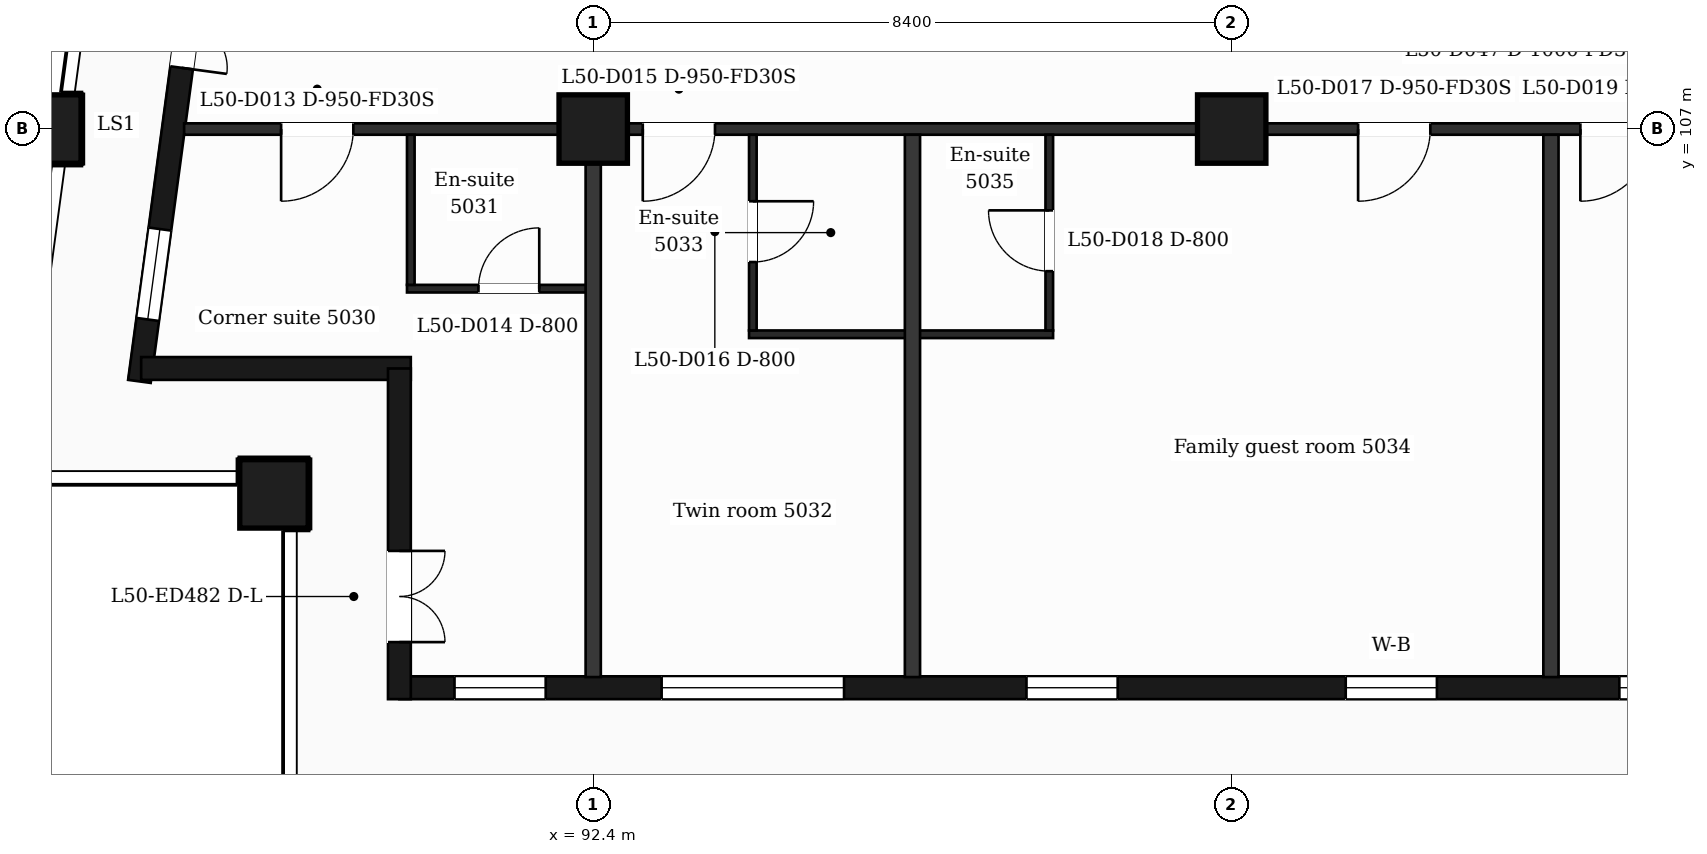
"""IFC4 building model, lengths in metres.
Left out: names, types, materials, properties, quantities, classifications, styles, units other than length and angle.
Written with IfcOpenShell. Run it as: python <this file> out.ifc"""

import sys

from ifc_helpers import new_model, si_unit, direction, frame, frame_2d, origin, origin_2d, place, context, subcontext, project, spatial, rectangle, extrude, element, fill, save


model = new_model("IFC4")
c1 = context("Model", 3, precision=1e-05, world=origin(), true_north=direction((0.0, 1.0)))
c2 = subcontext(c1, "Body", "Model", "MODEL_VIEW")
j1 = project(units=[si_unit("LENGTHUNIT", "METRE"), si_unit("PLANEANGLEUNIT", "RADIAN")], contexts=[c1])
p1 = place(None, origin())
s1 = spatial("IfcSite", under=j1, at=p1, CompositionType="ELEMENT")
p2 = place(p1, origin())
s2 = spatial("IfcBuilding", under=s1, at=p2, CompositionType="ELEMENT")
p3 = place(p2, frame((0.0, 0.0, 209.6)))
s3 = spatial("IfcBuildingStorey", under=s2, at=p3, CompositionType="ELEMENT", Elevation=209.6)
for number, where, z_axis, x_axis in (
    (1, (88.2, 102.2, 0.0), (0.0, 0.0, 1.0), (1.0, 0.0, 0.0)),
    (2, (92.4, 107.0, 0.0), (0.0, 0.0, 1.0), (1.0, 0.0, 0.0)),
    (3, (100.8, 107.0, 0.0), (0.0, 0.0, 1.0), (1.0, 0.0, 0.0)),
    (4, (85.211, 107.0, 0.0), (0.0, 0.0, 1.0), (1.0, 0.0, 0.0)),
):
    element("IfcColumn", number, at=place(p3, frame(where, z_axis=z_axis, x_axis=x_axis)), inside=s3, PredefinedType="COLUMN", context=c2, shape_type="SweptSolid", body=[
        extrude(rectangle(XDim=0.9, YDim=0.9, at=origin_2d()), origin(), (0.0, 0.0, 1.0), 3.7),
    ])
p4 = place(p3, frame((89.85, 99.65, 0.0), z_axis=(0.0, 0.0, 1.0), x_axis=(1.0, 0.0, 0.0)))
e5 = element("IfcWall", 5, at=p4, inside=s3, PredefinedType="SOLIDWALL", context=c2, shape_type="SweptSolid", body=[
    extrude(rectangle(XDim=47.25, YDim=0.3, at=frame_2d((23.625, 0.0))), origin(), (0.0, 0.0, 1.0), 3.38),
])
p5 = place(p4, frame((0.725, 0.0, 0.9)))
e6 = element("IfcOpeningElement", 6, at=p5, cuts=e5, PredefinedType="OPENING", context=c2, shape_type="SweptSolid", body=[
    extrude(rectangle(XDim=1.2, YDim=2.1, at=frame_2d((0.6, 1.05))), frame((0.0, 0.16, 0.0), z_axis=(0.0, -1.0, 0.0), x_axis=(1.0, 0.0, 0.0)), (0.0, 0.0, 1.0), 0.32),
])
p6 = place(p4, frame((3.45, 0.0, 0.9)))
e7 = element("IfcOpeningElement", 7, at=p6, cuts=e5, PredefinedType="OPENING", context=c2, shape_type="SweptSolid", body=[
    extrude(rectangle(XDim=2.4, YDim=2.1, at=frame_2d((1.2, 1.05))), frame((0.0, 0.16, 0.0), z_axis=(0.0, -1.0, 0.0), x_axis=(1.0, 0.0, 0.0)), (0.0, 0.0, 1.0), 0.32),
])
p7 = place(p4, frame((8.25, 0.0, 0.9)))
e8 = element("IfcOpeningElement", 8, at=p7, cuts=e5, PredefinedType="OPENING", context=c2, shape_type="SweptSolid", body=[
    extrude(rectangle(XDim=1.2, YDim=2.1, at=frame_2d((0.6, 1.05))), frame((0.0, 0.16, 0.0), z_axis=(0.0, -1.0, 0.0), x_axis=(1.0, 0.0, 0.0)), (0.0, 0.0, 1.0), 0.32),
])
p8 = place(p4, frame((12.45, 0.0, 0.9)))
e9 = element("IfcOpeningElement", 9, at=p8, cuts=e5, PredefinedType="OPENING", context=c2, shape_type="SweptSolid", body=[
    extrude(rectangle(XDim=1.2, YDim=2.1, at=frame_2d((0.6, 1.05))), frame((0.0, 0.16, 0.0), z_axis=(0.0, -1.0, 0.0), x_axis=(1.0, 0.0, 0.0)), (0.0, 0.0, 1.0), 0.32),
])
p9 = place(p4, frame((16.05, 0.0, 0.9)))
e10 = element("IfcOpeningElement", 10, at=p9, cuts=e5, PredefinedType="OPENING", context=c2, shape_type="SweptSolid", body=[
    extrude(rectangle(XDim=2.4, YDim=2.1, at=frame_2d((1.2, 1.05))), frame((0.0, 0.16, 0.0), z_axis=(0.0, -1.0, 0.0), x_axis=(1.0, 0.0, 0.0)), (0.0, 0.0, 1.0), 0.32),
])
p10 = place(p4, frame((20.25, 0.0, 0.9)))
e11 = element("IfcOpeningElement", 11, at=p10, cuts=e5, PredefinedType="OPENING", context=c2, shape_type="SweptSolid", body=[
    extrude(rectangle(XDim=2.4, YDim=2.1, at=frame_2d((1.2, 1.05))), frame((0.0, 0.16, 0.0), z_axis=(0.0, -1.0, 0.0), x_axis=(1.0, 0.0, 0.0)), (0.0, 0.0, 1.0), 0.32),
])
p11 = place(p4, frame((25.05, 0.0, 0.0)))
e12 = element("IfcOpeningElement", 12, at=p11, cuts=e5, PredefinedType="OPENING", context=c2, shape_type="SweptSolid", body=[
    extrude(rectangle(XDim=1.2, YDim=2.4, at=frame_2d((0.6, 1.2))), frame((0.0, 0.16, 0.0), z_axis=(0.0, -1.0, 0.0), x_axis=(1.0, 0.0, 0.0)), (0.0, 0.0, 1.0), 0.32),
])
p12 = place(p4, frame((28.65, 0.0, 0.9)))
e13 = element("IfcOpeningElement", 13, at=p12, cuts=e5, PredefinedType="OPENING", context=c2, shape_type="SweptSolid", body=[
    extrude(rectangle(XDim=2.4, YDim=2.1, at=frame_2d((1.2, 1.05))), frame((0.0, 0.16, 0.0), z_axis=(0.0, -1.0, 0.0), x_axis=(1.0, 0.0, 0.0)), (0.0, 0.0, 1.0), 0.32),
])
p13 = place(p4, frame((32.85, 0.0, 0.9)))
e14 = element("IfcOpeningElement", 14, at=p13, cuts=e5, PredefinedType="OPENING", context=c2, shape_type="SweptSolid", body=[
    extrude(rectangle(XDim=2.4, YDim=2.1, at=frame_2d((1.2, 1.05))), frame((0.0, 0.16, 0.0), z_axis=(0.0, -1.0, 0.0), x_axis=(1.0, 0.0, 0.0)), (0.0, 0.0, 1.0), 0.32),
])
p14 = place(p4, frame((37.65, 0.0, 0.9)))
e15 = element("IfcOpeningElement", 15, at=p14, cuts=e5, PredefinedType="OPENING", context=c2, shape_type="SweptSolid", body=[
    extrude(rectangle(XDim=1.2, YDim=2.1, at=frame_2d((0.6, 1.05))), frame((0.0, 0.16, 0.0), z_axis=(0.0, -1.0, 0.0), x_axis=(1.0, 0.0, 0.0)), (0.0, 0.0, 1.0), 0.32),
])
p15 = place(p4, frame((41.85, 0.0, 0.9)))
e16 = element("IfcOpeningElement", 16, at=p15, cuts=e5, PredefinedType="OPENING", context=c2, shape_type="SweptSolid", body=[
    extrude(rectangle(XDim=1.2, YDim=2.1, at=frame_2d((0.6, 1.05))), frame((0.0, 0.16, 0.0), z_axis=(0.0, -1.0, 0.0), x_axis=(1.0, 0.0, 0.0)), (0.0, 0.0, 1.0), 0.32),
])
p16 = place(p4, frame((45.25, 0.0, 0.9)))
e17 = element("IfcOpeningElement", 17, at=p16, cuts=e5, PredefinedType="OPENING", context=c2, shape_type="SweptSolid", body=[
    extrude(rectangle(XDim=1.2, YDim=2.1, at=frame_2d((0.6, 1.05))), frame((0.0, 0.16, 0.0), z_axis=(0.0, -1.0, 0.0), x_axis=(1.0, 0.0, 0.0)), (0.0, 0.0, 1.0), 0.32),
])
p17 = place(p3, frame((87.334, 110.4, 0.0), z_axis=(0.0, 0.0, 1.0), x_axis=(-0.133437175554, -0.991057273915, 0.0)))
e18 = element("IfcWall", 18, at=p17, inside=s3, PredefinedType="SOLIDWALL", context=c2, shape_type="SweptSolid", body=[
    extrude(rectangle(XDim=6.781, YDim=0.3, at=frame_2d((3.39, 0.0))), origin(), (0.0, 0.0, 1.0), 3.38),
])
p18 = place(p17, frame((1.418, 0.0, 0.0)))
e19 = element("IfcOpeningElement", 19, at=p18, cuts=e18, PredefinedType="OPENING", context=c2, shape_type="SweptSolid", body=[
    extrude(rectangle(XDim=1.2, YDim=2.4, at=frame_2d((0.6, 1.2))), frame((0.0, 0.16, 0.0), z_axis=(0.0, -1.0, 0.0), x_axis=(1.0, 0.0, 0.0)), (0.0, 0.0, 1.0), 0.32),
])
p19 = place(p17, frame((4.758, 0.0, 0.9)))
e20 = element("IfcOpeningElement", 20, at=p19, cuts=e18, PredefinedType="OPENING", context=c2, shape_type="SweptSolid", body=[
    extrude(rectangle(XDim=1.2, YDim=2.1, at=frame_2d((0.6, 1.05))), frame((0.0, 0.16, 0.0), z_axis=(0.0, -1.0, 0.0), x_axis=(1.0, 0.0, 0.0)), (0.0, 0.0, 1.0), 0.32),
])
p20 = place(p3, frame((86.452, 103.85, 0.0), z_axis=(0.0, 0.0, 1.0), x_axis=(1.0, 0.0, 0.0)))
e21 = element("IfcWall", 21, at=p20, inside=s3, PredefinedType="SOLIDWALL", context=c2, shape_type="SweptSolid", body=[
    extrude(rectangle(XDim=3.548, YDim=0.3, at=frame_2d((1.774, 0.0))), origin(), (0.0, 0.0, 1.0), 3.38),
])
p21 = place(p3, frame((89.85, 103.85, 0.0), z_axis=(0.0, 0.0, 1.0), x_axis=(0.0, -1.0, 0.0)))
e22 = element("IfcWall", 22, at=p21, inside=s3, PredefinedType="SOLIDWALL", context=c2, shape_type="SweptSolid", body=[
    extrude(rectangle(XDim=4.35, YDim=0.3, at=frame_2d((2.175, 0.0))), origin(), (0.0, 0.0, 1.0), 3.38),
])
p22 = place(p21, frame((2.4, 0.0, 0.0)))
e23 = element("IfcOpeningElement", 23, at=p22, cuts=e22, PredefinedType="OPENING", context=c2, shape_type="SweptSolid", body=[
    extrude(rectangle(XDim=1.2, YDim=2.4, at=frame_2d((0.6, 1.2))), frame((0.0, 0.16, 0.0), z_axis=(0.0, -1.0, 0.0), x_axis=(1.0, 0.0, 0.0)), (0.0, 0.0, 1.0), 0.32),
])
p23 = place(p3, frame((94.45, 104.3, 0.0), z_axis=(0.0, 0.0, 1.0), x_axis=(1.0, 0.0, 0.0)))
e24 = element("IfcWall", 24, at=p23, inside=s3, PredefinedType="PARTITIONING", context=c2, shape_type="SweptSolid", body=[
    extrude(rectangle(XDim=4.0, YDim=0.1, at=frame_2d((2.0, 0.0))), origin(), (0.0, 0.0, 1.0), 3.38),
])
p24 = place(p3, frame((89.95, 104.9, 0.0), z_axis=(0.0, 0.0, 1.0), x_axis=(1.0, 0.0, 0.0)))
e25 = element("IfcWall", 25, at=p24, inside=s3, PredefinedType="PARTITIONING", context=c2, shape_type="SweptSolid", body=[
    extrude(rectangle(XDim=2.45, YDim=0.1, at=frame_2d((1.225, 0.0))), origin(), (0.0, 0.0, 1.0), 3.38),
])
p25 = place(p24, frame((0.94, 0.0, 0.0)))
e26 = element("IfcOpeningElement", 26, at=p25, cuts=e25, PredefinedType="OPENING", context=c2, shape_type="SweptSolid", body=[
    extrude(rectangle(XDim=0.8, YDim=2.1, at=frame_2d((0.4, 1.05))), frame((0.0, 0.06, 0.0), z_axis=(0.0, -1.0, 0.0), x_axis=(1.0, 0.0, 0.0)), (0.0, 0.0, 1.0), 0.12),
])
p26 = place(p3, frame((87.018, 107.0, 0.0), z_axis=(0.0, 0.0, 1.0), x_axis=(1.0, 0.0, 0.0)))
e27 = element("IfcWall", 27, at=p26, inside=s3, PredefinedType="PARTITIONING", context=c2, shape_type="SweptSolid", body=[
    extrude(rectangle(XDim=52.765, YDim=0.15, at=frame_2d((26.382, 0.0))), origin(), (0.0, 0.0, 1.0), 3.38),
])
p27 = place(p26, frame((1.276, 0.0, 0.0)))
e28 = element("IfcOpeningElement", 28, at=p27, cuts=e27, PredefinedType="OPENING", context=c2, shape_type="SweptSolid", body=[
    extrude(rectangle(XDim=0.95, YDim=2.1, at=frame_2d((0.475, 1.05))), frame((0.0, 0.085, 0.0), z_axis=(0.0, -1.0, 0.0), x_axis=(1.0, 0.0, 0.0)), (0.0, 0.0, 1.0), 0.17),
])
p28 = place(p26, frame((6.034, 0.0, 0.0)))
e29 = element("IfcOpeningElement", 29, at=p28, cuts=e27, PredefinedType="OPENING", context=c2, shape_type="SweptSolid", body=[
    extrude(rectangle(XDim=0.95, YDim=2.1, at=frame_2d((0.475, 1.05))), frame((0.0, 0.085, 0.0), z_axis=(0.0, -1.0, 0.0), x_axis=(1.0, 0.0, 0.0)), (0.0, 0.0, 1.0), 0.17),
])
p29 = place(p26, frame((15.445, 0.0, 0.0)))
e30 = element("IfcOpeningElement", 30, at=p29, cuts=e27, PredefinedType="OPENING", context=c2, shape_type="SweptSolid", body=[
    extrude(rectangle(XDim=0.95, YDim=2.1, at=frame_2d((0.475, 1.05))), frame((0.0, 0.085, 0.0), z_axis=(0.0, -1.0, 0.0), x_axis=(1.0, 0.0, 0.0)), (0.0, 0.0, 1.0), 0.17),
])
p30 = place(p26, frame((18.369, 0.0, 0.0)))
e31 = element("IfcOpeningElement", 31, at=p30, cuts=e27, PredefinedType="OPENING", context=c2, shape_type="SweptSolid", body=[
    extrude(rectangle(XDim=0.95, YDim=2.1, at=frame_2d((0.475, 1.05))), frame((0.0, 0.085, 0.0), z_axis=(0.0, -1.0, 0.0), x_axis=(1.0, 0.0, 0.0)), (0.0, 0.0, 1.0), 0.17),
])
p31 = place(p26, frame((24.519, 0.0, 0.0)))
e32 = element("IfcOpeningElement", 32, at=p31, cuts=e27, PredefinedType="OPENING", context=c2, shape_type="SweptSolid", body=[
    extrude(rectangle(XDim=0.95, YDim=2.1, at=frame_2d((0.475, 1.05))), frame((0.0, 0.085, 0.0), z_axis=(0.0, -1.0, 0.0), x_axis=(1.0, 0.0, 0.0)), (0.0, 0.0, 1.0), 0.17),
])
p32 = place(p26, frame((26.632, 0.0, 0.0)))
e33 = element("IfcOpeningElement", 33, at=p32, cuts=e27, PredefinedType="OPENING", context=c2, shape_type="SweptSolid", body=[
    extrude(rectangle(XDim=1.0, YDim=2.1, at=frame_2d((0.5, 1.05))), frame((0.0, 0.085, 0.0), z_axis=(0.0, -1.0, 0.0), x_axis=(1.0, 0.0, 0.0)), (0.0, 0.0, 1.0), 0.17),
])
p33 = place(p26, frame((33.422, 0.0, 0.0)))
e34 = element("IfcOpeningElement", 34, at=p33, cuts=e27, PredefinedType="OPENING", context=c2, shape_type="SweptSolid", body=[
    extrude(rectangle(XDim=0.95, YDim=2.1, at=frame_2d((0.475, 1.05))), frame((0.0, 0.085, 0.0), z_axis=(0.0, -1.0, 0.0), x_axis=(1.0, 0.0, 0.0)), (0.0, 0.0, 1.0), 0.17),
])
p34 = place(p26, frame((35.057, 0.0, 0.0)))
e35 = element("IfcOpeningElement", 35, at=p34, cuts=e27, PredefinedType="OPENING", context=c2, shape_type="SweptSolid", body=[
    extrude(rectangle(XDim=0.95, YDim=2.1, at=frame_2d((0.475, 1.05))), frame((0.0, 0.085, 0.0), z_axis=(0.0, -1.0, 0.0), x_axis=(1.0, 0.0, 0.0)), (0.0, 0.0, 1.0), 0.17),
])
p35 = place(p26, frame((44.532, 0.0, 0.0)))
e36 = element("IfcOpeningElement", 36, at=p35, cuts=e27, PredefinedType="OPENING", context=c2, shape_type="SweptSolid", body=[
    extrude(rectangle(XDim=1.0, YDim=2.1, at=frame_2d((0.5, 1.05))), frame((0.0, 0.085, 0.0), z_axis=(0.0, -1.0, 0.0), x_axis=(1.0, 0.0, 0.0)), (0.0, 0.0, 1.0), 0.17),
])
p36 = place(p26, frame((48.249, 0.0, 0.0)))
e37 = element("IfcOpeningElement", 37, at=p36, cuts=e27, PredefinedType="OPENING", context=c2, shape_type="SweptSolid", body=[
    extrude(rectangle(XDim=0.95, YDim=2.1, at=frame_2d((0.475, 1.05))), frame((0.0, 0.085, 0.0), z_axis=(0.0, -1.0, 0.0), x_axis=(1.0, 0.0, 0.0)), (0.0, 0.0, 1.0), 0.17),
])
p37 = place(p3, frame((90.0, 104.95, 0.0), z_axis=(0.0, 0.0, 1.0), x_axis=(0.0, 1.0, 0.0)))
e38 = element("IfcWall", 38, at=p37, inside=s3, PredefinedType="PARTITIONING", context=c2, shape_type="SweptSolid", body=[
    extrude(rectangle(XDim=1.975, YDim=0.1, at=frame_2d((0.988, 0.0))), origin(), (0.0, 0.0, 1.0), 3.38),
])
p38 = place(p3, frame((92.4, 99.79, 0.0), z_axis=(0.0, 0.0, 1.0), x_axis=(0.0, 1.0, 0.0)))
e39 = element("IfcWall", 39, at=p38, inside=s3, PredefinedType="PARTITIONING", context=c2, shape_type="SweptSolid", body=[
    extrude(rectangle(XDim=7.135, YDim=0.2, at=frame_2d((3.567, 0.0))), origin(), (0.0, 0.0, 1.0), 3.38),
])
p39 = place(p3, frame((94.5, 104.35, 0.0), z_axis=(0.0, 0.0, 1.0), x_axis=(0.0, 1.0, 0.0)))
e40 = element("IfcWall", 40, at=p39, inside=s3, PredefinedType="PARTITIONING", context=c2, shape_type="SweptSolid", body=[
    extrude(rectangle(XDim=2.575, YDim=0.1, at=frame_2d((1.288, 0.0))), origin(), (0.0, 0.0, 1.0), 3.38),
])
p40 = place(p39, frame((0.9, 0.0, 0.0)))
e41 = element("IfcOpeningElement", 41, at=p40, cuts=e40, PredefinedType="OPENING", context=c2, shape_type="SweptSolid", body=[
    extrude(rectangle(XDim=0.8, YDim=2.1, at=frame_2d((0.4, 1.05))), frame((0.0, 0.06, 0.0), z_axis=(0.0, -1.0, 0.0), x_axis=(1.0, 0.0, 0.0)), (0.0, 0.0, 1.0), 0.12),
])
p41 = place(p3, frame((96.6, 99.79, 0.0), z_axis=(0.0, 0.0, 1.0), x_axis=(0.0, 1.0, 0.0)))
e42 = element("IfcWall", 42, at=p41, inside=s3, PredefinedType="PARTITIONING", context=c2, shape_type="SweptSolid", body=[
    extrude(rectangle(XDim=7.135, YDim=0.2, at=frame_2d((3.567, 0.0))), origin(), (0.0, 0.0, 1.0), 3.38),
])
p42 = place(p3, frame((98.4, 104.35, 0.0), z_axis=(0.0, 0.0, 1.0), x_axis=(0.0, 1.0, 0.0)))
e43 = element("IfcWall", 43, at=p42, inside=s3, PredefinedType="PARTITIONING", context=c2, shape_type="SweptSolid", body=[
    extrude(rectangle(XDim=2.575, YDim=0.1, at=frame_2d((1.288, 0.0))), origin(), (0.0, 0.0, 1.0), 3.38),
])
p43 = place(p42, frame((0.78, 0.0, 0.0)))
e44 = element("IfcOpeningElement", 44, at=p43, cuts=e43, PredefinedType="OPENING", context=c2, shape_type="SweptSolid", body=[
    extrude(rectangle(XDim=0.8, YDim=2.1, at=frame_2d((0.4, 1.05))), frame((0.0, 0.06, 0.0), z_axis=(0.0, -1.0, 0.0), x_axis=(1.0, 0.0, 0.0)), (0.0, 0.0, 1.0), 0.12),
])
p44 = place(p3, frame((105.0, 99.79, 0.0), z_axis=(0.0, 0.0, 1.0), x_axis=(0.0, 1.0, 0.0)))
e45 = element("IfcWall", 45, at=p44, inside=s3, PredefinedType="PARTITIONING", context=c2, shape_type="SweptSolid", body=[
    extrude(rectangle(XDim=7.135, YDim=0.2, at=frame_2d((3.567, 0.0))), origin(), (0.0, 0.0, 1.0), 3.38),
])
p45 = place(p5, origin())
e46 = element("IfcWindow", 46, at=p45, inside=s3, PartitioningType="SINGLE_PANEL", PredefinedType="WINDOW", context=c2, shape_type="SweptSolid", body=[
    extrude(rectangle(XDim=1.2, YDim=2.1, at=frame_2d((0.6, 1.05))), frame((0.0, 0.03, 0.0), z_axis=(0.0, -1.0, 0.0), x_axis=(1.0, 0.0, 0.0)), (0.0, 0.0, 1.0), 0.06),
])
fill(e6, e46)
p46 = place(p6, origin())
e47 = element("IfcWindow", 47, at=p46, inside=s3, PartitioningType="SINGLE_PANEL", PredefinedType="WINDOW", context=c2, shape_type="SweptSolid", body=[
    extrude(rectangle(XDim=2.4, YDim=2.1, at=frame_2d((1.2, 1.05))), frame((0.0, 0.03, 0.0), z_axis=(0.0, -1.0, 0.0), x_axis=(1.0, 0.0, 0.0)), (0.0, 0.0, 1.0), 0.06),
])
fill(e7, e47)
p47 = place(p7, origin())
e48 = element("IfcWindow", 48, at=p47, inside=s3, PartitioningType="SINGLE_PANEL", PredefinedType="WINDOW", context=c2, shape_type="SweptSolid", body=[
    extrude(rectangle(XDim=1.2, YDim=2.1, at=frame_2d((0.6, 1.05))), frame((0.0, 0.03, 0.0), z_axis=(0.0, -1.0, 0.0), x_axis=(1.0, 0.0, 0.0)), (0.0, 0.0, 1.0), 0.06),
])
fill(e8, e48)
p48 = place(p8, origin())
e49 = element("IfcWindow", 49, at=p48, inside=s3, PartitioningType="SINGLE_PANEL", PredefinedType="WINDOW", context=c2, shape_type="SweptSolid", body=[
    extrude(rectangle(XDim=1.2, YDim=2.1, at=frame_2d((0.6, 1.05))), frame((0.0, 0.03, 0.0), z_axis=(0.0, -1.0, 0.0), x_axis=(1.0, 0.0, 0.0)), (0.0, 0.0, 1.0), 0.06),
])
fill(e9, e49)
p49 = place(p9, origin())
e50 = element("IfcWindow", 50, at=p49, inside=s3, PartitioningType="SINGLE_PANEL", PredefinedType="WINDOW", context=c2, shape_type="SweptSolid", body=[
    extrude(rectangle(XDim=2.4, YDim=2.1, at=frame_2d((1.2, 1.05))), frame((0.0, 0.03, 0.0), z_axis=(0.0, -1.0, 0.0), x_axis=(1.0, 0.0, 0.0)), (0.0, 0.0, 1.0), 0.06),
])
fill(e10, e50)
p50 = place(p18, origin())
e51 = element("IfcDoor", 51, at=p50, inside=s3, OperationType="DOUBLE_DOOR_SINGLE_SWING", PredefinedType="DOOR", context=c2, shape_type="SweptSolid", body=[
    extrude(rectangle(XDim=1.2, YDim=2.4, at=frame_2d((0.6, 1.2))), frame((0.0, 0.025, 0.0), z_axis=(0.0, -1.0, 0.0), x_axis=(1.0, 0.0, 0.0)), (0.0, 0.0, 1.0), 0.05),
])
fill(e19, e51)
p51 = place(p19, origin())
e52 = element("IfcWindow", 52, at=p51, inside=s3, PartitioningType="SINGLE_PANEL", PredefinedType="WINDOW", context=c2, shape_type="SweptSolid", body=[
    extrude(rectangle(XDim=1.2, YDim=2.1, at=frame_2d((0.6, 1.05))), frame((0.0, 0.03, 0.0), z_axis=(0.0, -1.0, 0.0), x_axis=(1.0, 0.0, 0.0)), (0.0, 0.0, 1.0), 0.06),
])
fill(e20, e52)
p52 = place(p22, origin())
e53 = element("IfcDoor", 53, at=p52, inside=s3, OperationType="DOUBLE_DOOR_SINGLE_SWING", PredefinedType="DOOR", context=c2, shape_type="SweptSolid", body=[
    extrude(rectangle(XDim=1.2, YDim=2.4, at=frame_2d((0.6, 1.2))), frame((0.0, 0.025, 0.0), z_axis=(0.0, -1.0, 0.0), x_axis=(1.0, 0.0, 0.0)), (0.0, 0.0, 1.0), 0.05),
])
fill(e23, e53)
p53 = place(p27, origin())
e54 = element("IfcDoor", 54, at=p53, inside=s3, OperationType="SINGLE_SWING_LEFT", PredefinedType="DOOR", context=c2, shape_type="SweptSolid", body=[
    extrude(rectangle(XDim=0.95, YDim=2.1, at=frame_2d((0.475, 1.05))), frame((0.0, 0.025, 0.0), z_axis=(0.0, -1.0, 0.0), x_axis=(1.0, 0.0, 0.0)), (0.0, 0.0, 1.0), 0.05),
])
fill(e28, e54)
p54 = place(p25, origin())
e55 = element("IfcDoor", 55, at=p54, inside=s3, OperationType="SINGLE_SWING_RIGHT", PredefinedType="DOOR", context=c2, shape_type="SweptSolid", body=[
    extrude(rectangle(XDim=0.8, YDim=2.1, at=frame_2d((0.4, 1.05))), frame((0.0, 0.025, 0.0), z_axis=(0.0, -1.0, 0.0), x_axis=(1.0, 0.0, 0.0)), (0.0, 0.0, 1.0), 0.05),
])
fill(e26, e55)
p55 = place(p28, origin())
e56 = element("IfcDoor", 56, at=p55, inside=s3, OperationType="SINGLE_SWING_LEFT", PredefinedType="DOOR", context=c2, shape_type="SweptSolid", body=[
    extrude(rectangle(XDim=0.95, YDim=2.1, at=frame_2d((0.475, 1.05))), frame((0.0, 0.025, 0.0), z_axis=(0.0, -1.0, 0.0), x_axis=(1.0, 0.0, 0.0)), (0.0, 0.0, 1.0), 0.05),
])
fill(e29, e56)
p56 = place(p40, origin())
e57 = element("IfcDoor", 57, at=p56, inside=s3, OperationType="SINGLE_SWING_RIGHT", PredefinedType="DOOR", context=c2, shape_type="SweptSolid", body=[
    extrude(rectangle(XDim=0.8, YDim=2.1, at=frame_2d((0.4, 1.05))), frame((0.0, 0.025, 0.0), z_axis=(0.0, -1.0, 0.0), x_axis=(1.0, 0.0, 0.0)), (0.0, 0.0, 1.0), 0.05),
])
fill(e41, e57)
p57 = place(p29, origin())
e58 = element("IfcDoor", 58, at=p57, inside=s3, OperationType="SINGLE_SWING_LEFT", PredefinedType="DOOR", context=c2, shape_type="SweptSolid", body=[
    extrude(rectangle(XDim=0.95, YDim=2.1, at=frame_2d((0.475, 1.05))), frame((0.0, 0.025, 0.0), z_axis=(0.0, -1.0, 0.0), x_axis=(1.0, 0.0, 0.0)), (0.0, 0.0, 1.0), 0.05),
])
fill(e30, e58)
p58 = place(p43, origin())
e59 = element("IfcDoor", 59, at=p58, inside=s3, OperationType="SINGLE_SWING_RIGHT", PredefinedType="DOOR", context=c2, shape_type="SweptSolid", body=[
    extrude(rectangle(XDim=0.8, YDim=2.1, at=frame_2d((0.4, 1.05))), frame((0.0, 0.025, 0.0), z_axis=(0.0, -1.0, 0.0), x_axis=(1.0, 0.0, 0.0)), (0.0, 0.0, 1.0), 0.05),
])
fill(e44, e59)
p59 = place(p30, origin())
e60 = element("IfcDoor", 60, at=p59, inside=s3, OperationType="SINGLE_SWING_LEFT", PredefinedType="DOOR", context=c2, shape_type="SweptSolid", body=[
    extrude(rectangle(XDim=0.95, YDim=2.1, at=frame_2d((0.475, 1.05))), frame((0.0, 0.025, 0.0), z_axis=(0.0, -1.0, 0.0), x_axis=(1.0, 0.0, 0.0)), (0.0, 0.0, 1.0), 0.05),
])
fill(e31, e60)
save(model, sys.argv[1])
